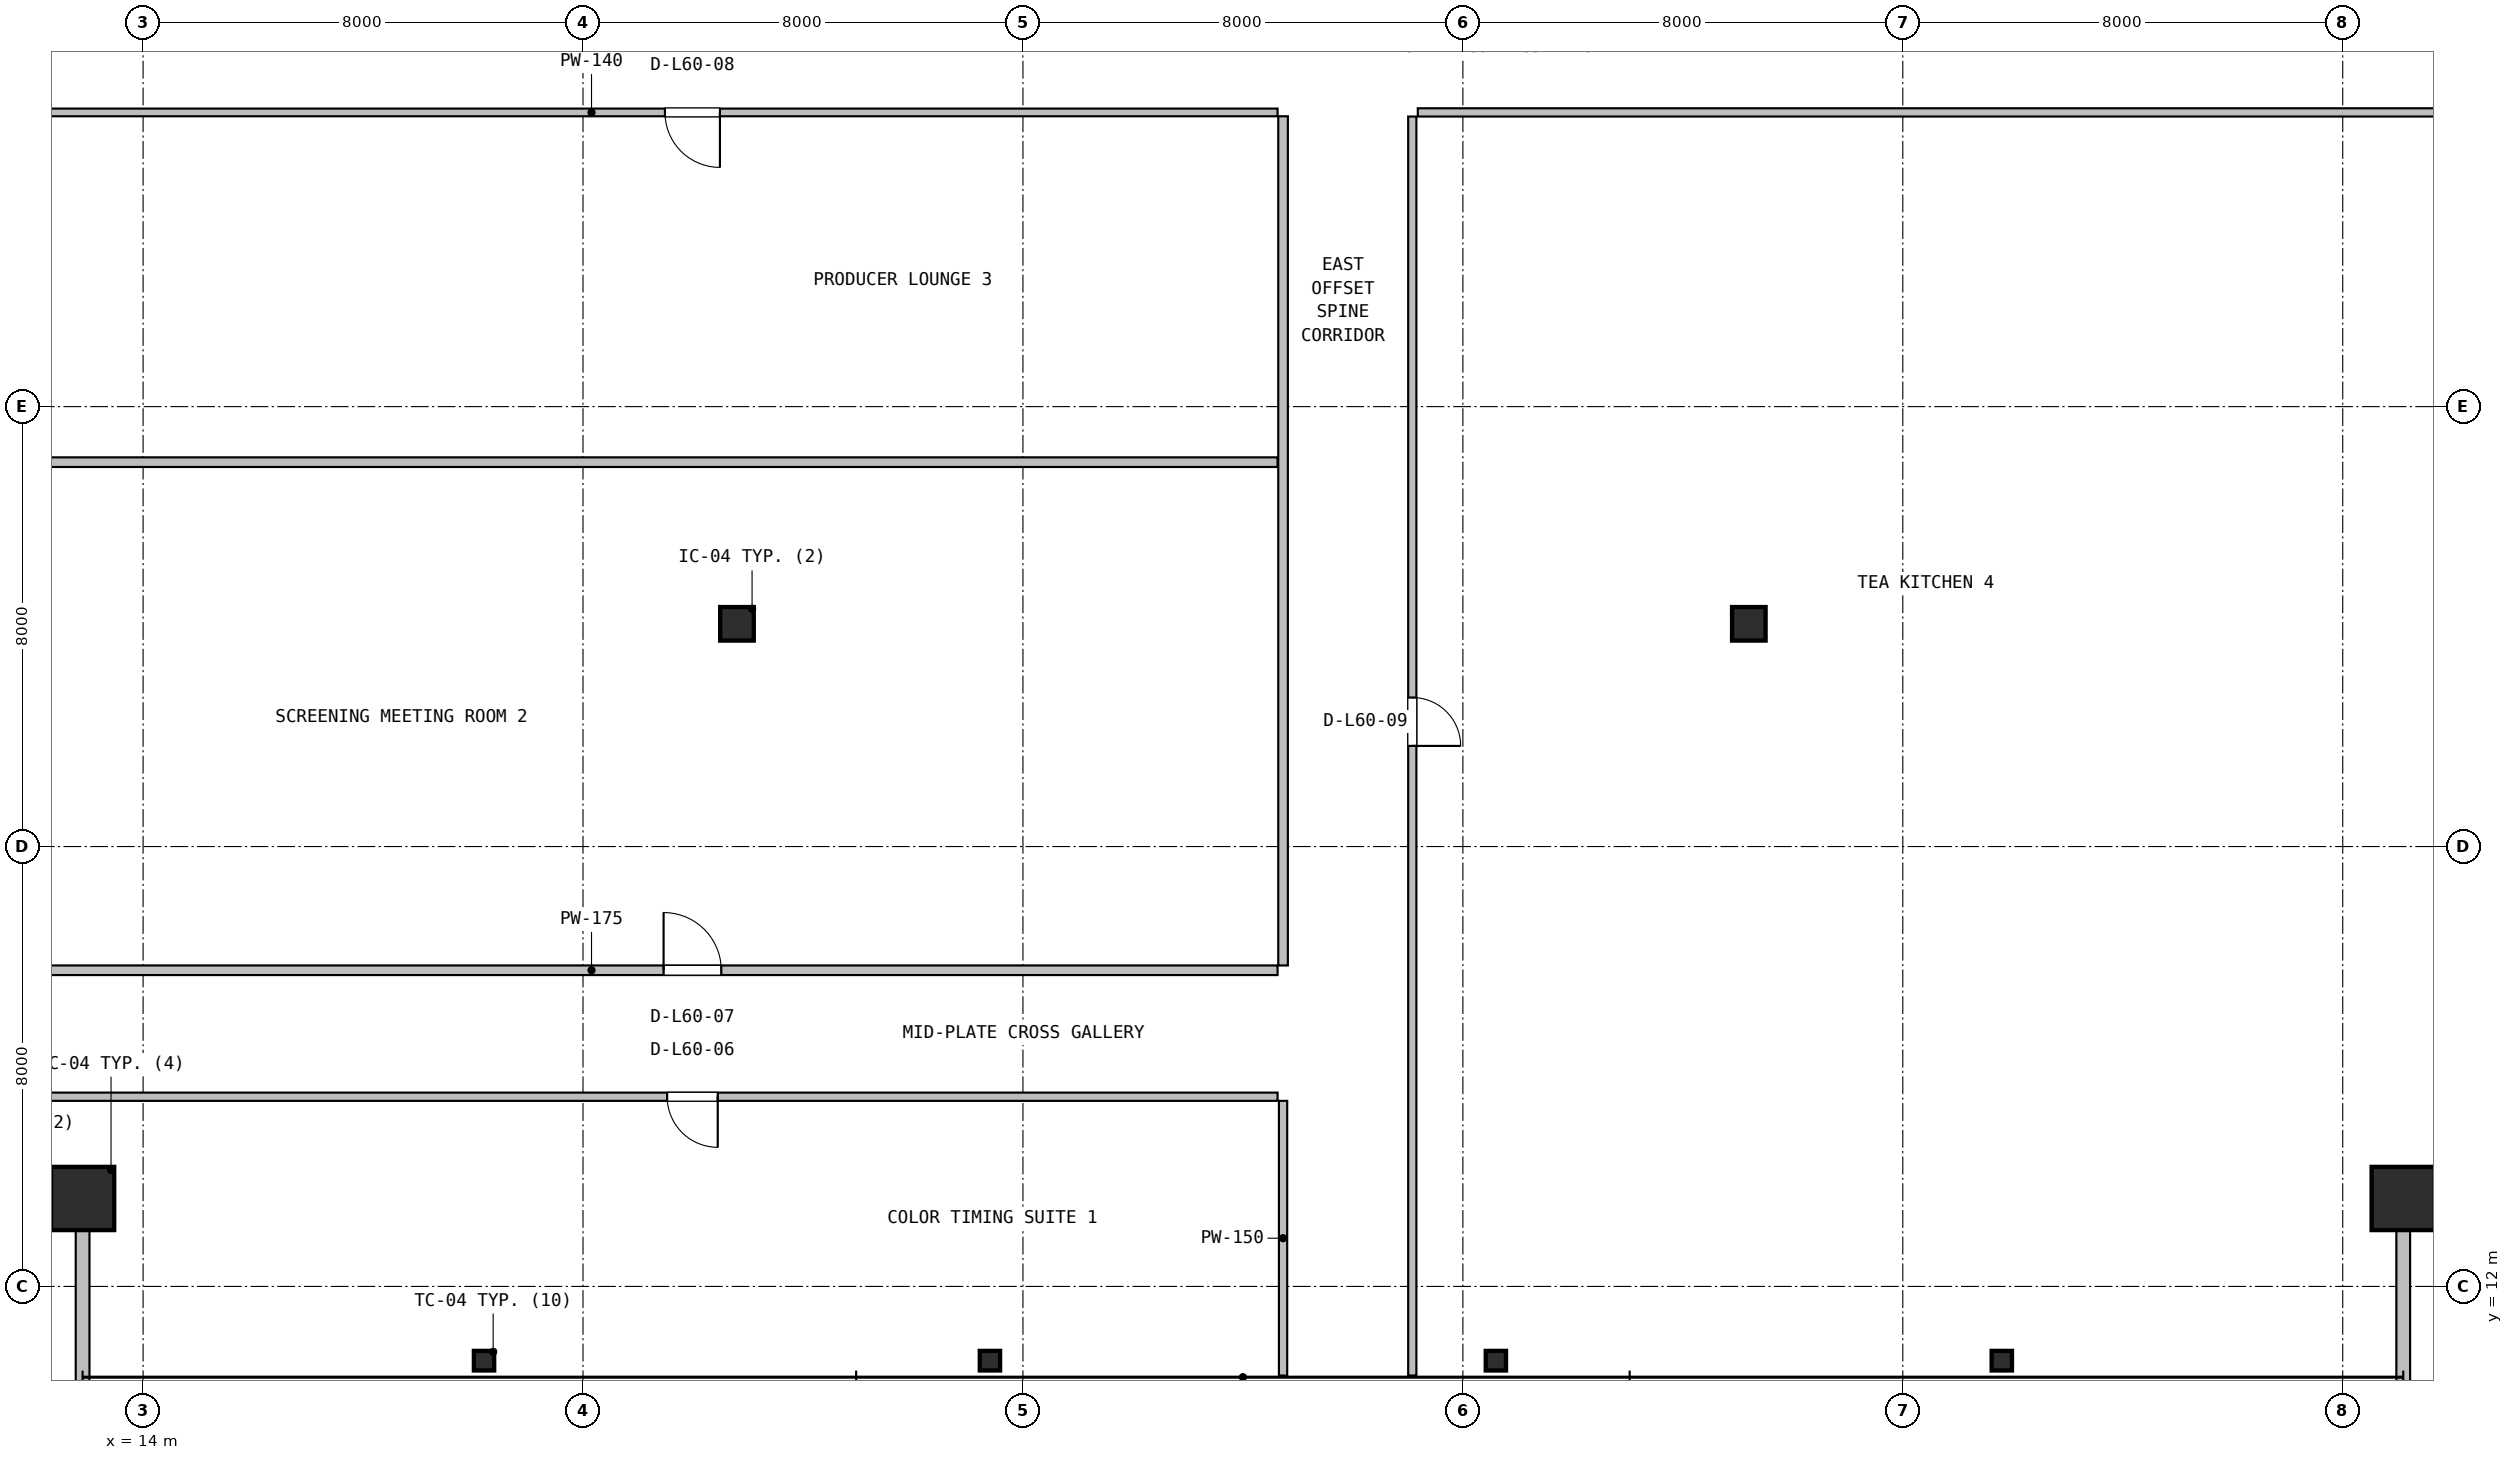
"""IFC4 building model, lengths in metres.
Left out: names, types, materials, properties, quantities, classifications, styles, units other than length and angle.
Written with IfcOpenShell. Run it as: python <this file> out.ifc"""

import sys

from ifc_helpers import new_model, si_unit, direction, frame, frame_2d, origin, origin_2d, place, context, subcontext, project, spatial, rectangle, hollow_rectangle, hollow_circle, i_section, extrude, source, transform, mapped, element, fill, save


model = new_model("IFC4")
c1 = context("Model", 3, precision=1e-05, world=origin(), true_north=direction((0.0, 1.0)))
c2 = subcontext(c1, "Body", "Model", "MODEL_VIEW")
j1 = project(units=[si_unit("LENGTHUNIT", "METRE"), si_unit("PLANEANGLEUNIT", "RADIAN")], contexts=[c1])
p1 = place(None, origin())
s1 = spatial("IfcSite", under=j1, at=p1, CompositionType="ELEMENT")
p2 = place(p1, origin())
s2 = spatial("IfcBuilding", under=s1, at=p2, CompositionType="ELEMENT")
p3 = place(p2, frame((0.0, 0.0, 243.2)))
s3 = spatial("IfcBuildingStorey", under=s2, at=p3, CompositionType="ELEMENT", Elevation=243.2)
m1 = source(origin(), c2, "Body", "SweptSolid", [
    extrude(hollow_rectangle(XDim=1.15, YDim=1.15, WallThickness=0.045, at=origin_2d()), origin(), (0.0, 0.0, 1.0), 3.8),
])
for number, where, z_axis, x_axis in (
    (1, (12.9, 13.6, 0.0), (0.0, 0.0, 1.0), (1.0, 0.0, 0.0)),
    (2, (55.1, 13.6, 0.0), (0.0, 0.0, 1.0), (1.0, 0.0, 0.0)),
):
    element("IfcColumn", number, at=place(p3, frame(where, z_axis=z_axis, x_axis=x_axis)), inside=s3, PredefinedType="COLUMN", context=c2, shape_type="MappedRepresentation", body=[
        mapped(m1, transform((0.0, 0.0, 0.0), x_axis=(1.0, 0.0, 0.0), y_axis=(0.0, 1.0, 0.0), z_axis=(0.0, 0.0, 1.0), scale=1.0)),
    ])
m2 = source(origin(), c2, "Body", "SweptSolid", [
    extrude(i_section(OverallWidth=0.369, OverallDepth=0.356, WebThickness=0.011, FlangeThickness=0.018, FilletRadius=0.016, at=origin_2d()), origin(), (0.0, 0.0, 1.0), 3.8),
])
for number, where, z_axis, x_axis in (
    (3, (20.2, 10.65, 0.0), (0.0, 0.0, 1.0), (1.0, 0.0, 0.0)),
    (4, (29.4, 10.65, 0.0), (0.0, 0.0, 1.0), (1.0, 0.0, 0.0)),
    (5, (38.6, 10.65, 0.0), (0.0, 0.0, 1.0), (1.0, 0.0, 0.0)),
    (6, (47.8, 10.65, 0.0), (0.0, 0.0, 1.0), (1.0, 0.0, 0.0)),
):
    element("IfcColumn", number, at=place(p3, frame(where, z_axis=z_axis, x_axis=x_axis)), inside=s3, PredefinedType="COLUMN", context=c2, shape_type="MappedRepresentation", body=[
        mapped(m2, transform((0.0, 0.0, 0.0), x_axis=(1.0, 0.0, 0.0), y_axis=(0.0, 1.0, 0.0), z_axis=(0.0, 0.0, 1.0), scale=1.0)),
    ])
m3 = source(origin(), c2, "Body", "SweptSolid", [
    extrude(hollow_circle(Radius=0.305, WallThickness=0.025, at=origin_2d()), origin(), (0.0, 0.0, 1.0), 3.8),
])
for number, where, z_axis, x_axis in (
    (7, (24.8, 24.05, 0.0), (0.0, 0.0, 1.0), (1.0, 0.0, 0.0)),
    (8, (43.2, 24.05, 0.0), (0.0, 0.0, 1.0), (1.0, 0.0, 0.0)),
):
    element("IfcColumn", number, at=place(p3, frame(where, z_axis=z_axis, x_axis=x_axis)), inside=s3, PredefinedType="COLUMN", context=c2, shape_type="MappedRepresentation", body=[
        mapped(m3, transform((0.0, 0.0, 0.0), x_axis=(1.0, 0.0, 0.0), y_axis=(0.0, 1.0, 0.0), z_axis=(0.0, 0.0, 1.0), scale=1.0)),
    ])
for number, where, z_axis, x_axis in (
    (9, (12.9, 10.28, 0.0), (0.0, 0.0, 1.0), (0.0, 1.0, 0.0)),
    (10, (55.1, 10.28, 0.0), (0.0, 0.0, 1.0), (0.0, 1.0, 0.0)),
):
    element("IfcWall", number, at=place(p3, frame(where, z_axis=z_axis, x_axis=x_axis)), inside=s3, PredefinedType="SOLIDWALL", context=c2, shape_type="SweptSolid", body=[
        extrude(rectangle(XDim=3.4, YDim=0.25, at=frame_2d((1.7, 0.0))), origin(), (0.0, 0.0, 1.0), 3.171),
    ])
p4 = place(p3, frame((34.73, 10.38, 0.0), z_axis=(0.0, 0.0, 1.0), x_axis=(0.0, 1.0, 0.0)))
e11 = element("IfcWall", 11, at=p4, inside=s3, PredefinedType="PARTITIONING", context=c2, shape_type="SweptSolid", body=[
    extrude(rectangle(XDim=4.995, YDim=0.15, at=frame_2d((2.498, 0.0))), origin(), (0.0, 0.0, 1.0), 3.171),
])
p5 = place(p3, frame((9.68, 15.45, 0.0), z_axis=(0.0, 0.0, 1.0), x_axis=(1.0, 0.0, 0.0)))
e12 = element("IfcWall", 12, at=p5, inside=s3, PredefinedType="PARTITIONING", context=c2, shape_type="SweptSolid", body=[
    extrude(rectangle(XDim=24.95, YDim=0.15, at=frame_2d((12.475, 0.0))), origin(), (0.0, 0.0, 1.0), 2.908),
])
p6 = place(p5, frame((13.85, 0.0, 0.0)))
e13 = element("IfcOpeningElement", 13, at=p6, cuts=e12, PredefinedType="OPENING", context=c2, shape_type="SweptSolid", body=[
    extrude(rectangle(XDim=0.92, YDim=2.08, at=frame_2d((0.46, 1.04))), frame((0.0, 0.085, 0.0), z_axis=(0.0, -1.0, 0.0), x_axis=(1.0, 0.0, 0.0)), (0.0, 0.0, 1.0), 0.17),
])
p7 = place(p3, frame((9.68, 17.75, 0.0), z_axis=(0.0, 0.0, 1.0), x_axis=(1.0, 0.0, 0.0)))
e14 = element("IfcWall", 14, at=p7, inside=s3, PredefinedType="PARTITIONING", context=c2, shape_type="SweptSolid", body=[
    extrude(rectangle(XDim=24.95, YDim=0.175, at=frame_2d((12.475, 0.0))), origin(), (0.0, 0.0, 1.0), 2.908),
])
p8 = place(p7, frame((13.785, 0.0, 0.0)))
e15 = element("IfcOpeningElement", 15, at=p8, cuts=e14, PredefinedType="OPENING", context=c2, shape_type="SweptSolid", body=[
    extrude(rectangle(XDim=1.05, YDim=2.1, at=frame_2d((0.525, 1.05))), frame((0.0, 0.098, 0.0), z_axis=(0.0, -1.0, 0.0), x_axis=(1.0, 0.0, 0.0)), (0.0, 0.0, 1.0), 0.195),
])
p9 = place(p3, frame((34.73, 17.837, 0.0), z_axis=(0.0, 0.0, 1.0), x_axis=(0.0, 1.0, 0.0)))
e16 = element("IfcWall", 16, at=p9, inside=s3, PredefinedType="PARTITIONING", context=c2, shape_type="SweptSolid", body=[
    extrude(rectangle(XDim=15.443, YDim=0.175, at=frame_2d((7.722, 0.0))), origin(), (0.0, 0.0, 1.0), 2.908),
])
p10 = place(p3, frame((9.68, 26.99, 0.0), z_axis=(0.0, 0.0, 1.0), x_axis=(1.0, 0.0, 0.0)))
e17 = element("IfcWall", 17, at=p10, inside=s3, PredefinedType="PARTITIONING", context=c2, shape_type="SweptSolid", body=[
    extrude(rectangle(XDim=24.95, YDim=0.175, at=frame_2d((12.475, 0.0))), origin(), (0.0, 0.0, 1.0), 2.908),
])
p11 = place(p3, frame((9.68, 33.35, 0.0), z_axis=(0.0, 0.0, 1.0), x_axis=(1.0, 0.0, 0.0)))
e18 = element("IfcWall", 18, at=p11, inside=s3, PredefinedType="PARTITIONING", context=c2, shape_type="SweptSolid", body=[
    extrude(rectangle(XDim=24.95, YDim=0.14, at=frame_2d((12.475, 0.0))), origin(), (0.0, 0.0, 1.0), 2.908),
])
p12 = place(p11, frame((13.81, 0.0, 0.0)))
e19 = element("IfcOpeningElement", 19, at=p12, cuts=e18, PredefinedType="OPENING", context=c2, shape_type="SweptSolid", body=[
    extrude(rectangle(XDim=1.0, YDim=2.1, at=frame_2d((0.5, 1.05))), frame((0.0, 0.08, 0.0), z_axis=(0.0, -1.0, 0.0), x_axis=(1.0, 0.0, 0.0)), (0.0, 0.0, 1.0), 0.16),
])
p13 = place(p3, frame((37.18, 33.35, 0.0), z_axis=(0.0, 0.0, 1.0), x_axis=(1.0, 0.0, 0.0)))
e20 = element("IfcWall", 20, at=p13, inside=s3, PredefinedType="PARTITIONING", context=c2, shape_type="SweptSolid", body=[
    extrude(rectangle(XDim=21.14, YDim=0.15, at=frame_2d((10.57, 0.0))), origin(), (0.0, 0.0, 1.0), 2.908),
])
p14 = place(p3, frame((37.08, 10.38, 0.0), z_axis=(0.0, 0.0, 1.0), x_axis=(0.0, 1.0, 0.0)))
e21 = element("IfcWall", 21, at=p14, inside=s3, PredefinedType="PARTITIONING", context=c2, shape_type="SweptSolid", body=[
    extrude(rectangle(XDim=22.895, YDim=0.15, at=frame_2d((11.448, 0.0))), origin(), (0.0, 0.0, 1.0), 2.908),
])
p15 = place(p14, frame((11.45, 0.0, 0.0)))
e22 = element("IfcOpeningElement", 22, at=p15, cuts=e21, PredefinedType="OPENING", context=c2, shape_type="SweptSolid", body=[
    extrude(rectangle(XDim=0.88, YDim=2.06, at=frame_2d((0.44, 1.03))), frame((0.0, 0.085, 0.0), z_axis=(0.0, -1.0, 0.0), x_axis=(1.0, 0.0, 0.0)), (0.0, 0.0, 1.0), 0.17),
])
m4 = source(origin(), c2, "Body", "SweptSolid", [
    extrude(rectangle(XDim=0.92, YDim=2.08, at=frame_2d((0.46, 1.04))), frame((0.0, 0.025, 0.0), z_axis=(0.0, -1.0, 0.0), x_axis=(1.0, 0.0, 0.0)), (0.0, 0.0, 1.0), 0.05),
])
p16 = place(p6, frame((0.92, 0.0, 0.0), z_axis=(0.0, 0.0, 1.0), x_axis=(-1.0, 0.0, 0.0)))
e23 = element("IfcDoor", 23, at=p16, inside=s3, OperationType="SINGLE_SWING_RIGHT", PredefinedType="DOOR", context=c2, shape_type="MappedRepresentation", body=[
    mapped(m4, transform((0.0, 0.0, 0.0), x_axis=(1.0, 0.0, 0.0), y_axis=(0.0, 1.0, 0.0), z_axis=(0.0, 0.0, 1.0), scale=1.0)),
])
fill(e13, e23)
m5 = source(origin(), c2, "Body", "SweptSolid", [
    extrude(rectangle(XDim=1.05, YDim=2.1, at=frame_2d((0.525, 1.05))), frame((0.0, 0.025, 0.0), z_axis=(0.0, -1.0, 0.0), x_axis=(1.0, 0.0, 0.0)), (0.0, 0.0, 1.0), 0.05),
])
p17 = place(p8, origin())
e24 = element("IfcDoor", 24, at=p17, inside=s3, OperationType="SINGLE_SWING_LEFT", PredefinedType="DOOR", context=c2, shape_type="MappedRepresentation", body=[
    mapped(m5, transform((0.0, 0.0, 0.0), x_axis=(1.0, 0.0, 0.0), y_axis=(0.0, 1.0, 0.0), z_axis=(0.0, 0.0, 1.0), scale=1.0)),
])
fill(e15, e24)
m6 = source(origin(), c2, "Body", "SweptSolid", [
    extrude(rectangle(XDim=1.0, YDim=2.1, at=frame_2d((0.5, 1.05))), frame((0.0, 0.025, 0.0), z_axis=(0.0, -1.0, 0.0), x_axis=(1.0, 0.0, 0.0)), (0.0, 0.0, 1.0), 0.05),
])
p18 = place(p12, frame((1.0, 0.0, 0.0), z_axis=(0.0, 0.0, 1.0), x_axis=(-1.0, 0.0, 0.0)))
e25 = element("IfcDoor", 25, at=p18, inside=s3, OperationType="SINGLE_SWING_RIGHT", PredefinedType="DOOR", context=c2, shape_type="MappedRepresentation", body=[
    mapped(m6, transform((0.0, 0.0, 0.0), x_axis=(1.0, 0.0, 0.0), y_axis=(0.0, 1.0, 0.0), z_axis=(0.0, 0.0, 1.0), scale=1.0)),
])
fill(e19, e25)
m7 = source(origin(), c2, "Body", "SweptSolid", [
    extrude(rectangle(XDim=0.88, YDim=2.06, at=frame_2d((0.44, 1.03))), frame((0.0, 0.025, 0.0), z_axis=(0.0, -1.0, 0.0), x_axis=(1.0, 0.0, 0.0)), (0.0, 0.0, 1.0), 0.05),
])
p19 = place(p15, frame((0.88, 0.0, 0.0), z_axis=(0.0, 0.0, 1.0), x_axis=(-1.0, 0.0, 0.0)))
e26 = element("IfcDoor", 26, at=p19, inside=s3, OperationType="SINGLE_SWING_LEFT", PredefinedType="DOOR", context=c2, shape_type="MappedRepresentation", body=[
    mapped(m7, transform((0.0, 0.0, 0.0), x_axis=(1.0, 0.0, 0.0), y_axis=(0.0, 1.0, 0.0), z_axis=(0.0, 0.0, 1.0), scale=1.0)),
])
fill(e22, e26)
save(model, sys.argv[1])
